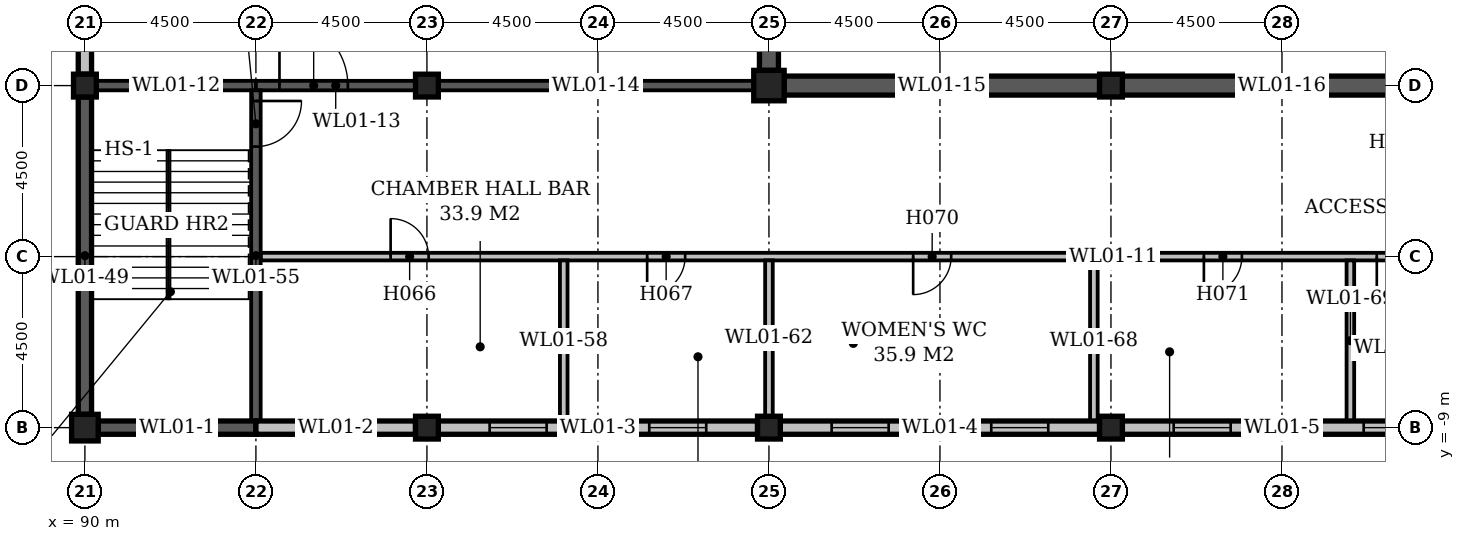
"""IFC4 building model, lengths in metres.
Left out: names, types, materials, properties, quantities, classifications, styles, units other than length and angle.
Written with IfcOpenShell. Run it as: python <this file> out.ifc"""

import sys

from ifc_helpers import new_model, si_unit, direction, frame, frame_2d, origin, origin_2d, place, context, subcontext, project, spatial, rectangle, extrude, element, fill, save


model = new_model("IFC4")
c1 = context("Model", 3, precision=1e-05, world=origin(), true_north=direction((0.0, 1.0)))
c2 = subcontext(c1, "Body", "Model", "MODEL_VIEW")
j1 = project(units=[si_unit("LENGTHUNIT", "METRE"), si_unit("PLANEANGLEUNIT", "RADIAN")], contexts=[c1])
p1 = place(None, origin())
s1 = spatial("IfcSite", under=j1, at=p1, CompositionType="ELEMENT")
p2 = place(p1, origin())
s2 = spatial("IfcBuilding", under=s1, at=p2, CompositionType="ELEMENT")
p3 = place(p2, frame((0.0, 0.0, 9.0)))
s3 = spatial("IfcBuildingStorey", under=s2, at=p3, CompositionType="ELEMENT", Elevation=9.0)
p4 = place(p3, frame((90.0, -9.0, 0.0), z_axis=(0.0, 0.0, 1.0), x_axis=(1.0, 0.0, 0.0)))
e1 = element("IfcColumn", 1, at=p4, inside=s3, PredefinedType="COLUMN", context=c2, shape_type="SweptSolid", body=[
    extrude(rectangle(XDim=0.7, YDim=0.7, at=origin_2d()), origin(), (0.0, 0.0, 1.0), 4.7),
])
for number, where, z_axis, x_axis in (
    (2, (90.0, 0.0, 0.0), (0.0, 0.0, 1.0), (1.0, 0.0, 0.0)),
    (3, (99.0, -9.0, 0.0), (0.0, 0.0, 1.0), (1.0, 0.0, 0.0)),
    (4, (99.0, 0.0, 0.0), (0.0, 0.0, 1.0), (1.0, 0.0, 0.0)),
    (5, (108.0, -9.0, 0.0), (0.0, 0.0, 1.0), (1.0, 0.0, 0.0)),
):
    element("IfcColumn", number, at=place(p3, frame(where, z_axis=z_axis, x_axis=x_axis)), inside=s3, PredefinedType="COLUMN", context=c2, shape_type="SweptSolid", body=[
        extrude(rectangle(XDim=0.6, YDim=0.6, at=origin_2d()), origin(), (0.0, 0.0, 1.0), 4.7),
    ])
p5 = place(p3, frame((108.0, 0.0, -0.3), z_axis=(0.0, 0.0, 1.0), x_axis=(1.0, 0.0, 0.0)))
e6 = element("IfcColumn", 6, at=p5, inside=s3, PredefinedType="COLUMN", context=c2, shape_type="SweptSolid", body=[
    extrude(rectangle(XDim=0.8, YDim=0.8, at=origin_2d()), origin(), (0.0, 0.0, 1.0), 5.0),
])
p6 = place(p3, frame((117.0, -9.0, 0.0), z_axis=(0.0, 0.0, 1.0), x_axis=(1.0, 0.0, 0.0)))
e7 = element("IfcColumn", 7, at=p6, inside=s3, PredefinedType="COLUMN", context=c2, shape_type="SweptSolid", body=[
    extrude(rectangle(XDim=0.6, YDim=0.6, at=origin_2d()), origin(), (0.0, 0.0, 1.0), 4.7),
])
p7 = place(p3, frame((117.0, 0.0, -0.3), z_axis=(0.0, 0.0, 1.0), x_axis=(1.0, 0.0, 0.0)))
e8 = element("IfcColumn", 8, at=p7, inside=s3, PredefinedType="COLUMN", context=c2, shape_type="SweptSolid", body=[
    extrude(rectangle(XDim=0.6, YDim=0.6, at=origin_2d()), origin(), (0.0, 0.0, 1.0), 5.0),
])
p8 = place(p3, frame((90.35, -9.0, 0.0), z_axis=(0.0, 0.0, 1.0), x_axis=(1.0, 0.0, 0.0)))
e9 = element("IfcWall", 9, at=p8, inside=s3, PredefinedType="STANDARD", context=c2, shape_type="SweptSolid", body=[
    extrude(rectangle(XDim=4.15, YDim=0.35, at=frame_2d((2.075, 0.0))), origin(), (0.0, 0.0, 1.0), 5.0),
])
p9 = place(p3, frame((94.5, -9.0, 0.0), z_axis=(0.0, 0.0, 1.0), x_axis=(1.0, 0.0, 0.0)))
e10 = element("IfcWall", 10, at=p9, inside=s3, PredefinedType="STANDARD", context=c2, shape_type="SweptSolid", body=[
    extrude(rectangle(XDim=4.2, YDim=0.35, at=frame_2d((2.1, 0.0))), origin(), (0.0, 0.0, 1.0), 4.1),
])
p10 = place(p9, frame((1.35, 0.0, 1.0)))
e11 = element("IfcOpeningElement", 11, at=p10, cuts=e10, PredefinedType="OPENING", context=c2, shape_type="SweptSolid", body=[
    extrude(rectangle(XDim=1.5, YDim=2.4, at=frame_2d((0.75, 1.2))), frame((0.0, 0.187, 0.0), z_axis=(0.0, -1.0, 0.0), x_axis=(1.0, 0.0, 0.0)), (0.0, 0.0, 1.0), 0.374),
])
p11 = place(p3, frame((99.3, -9.0, 0.0), z_axis=(0.0, 0.0, 1.0), x_axis=(1.0, 0.0, 0.0)))
e12 = element("IfcWall", 12, at=p11, inside=s3, PredefinedType="STANDARD", context=c2, shape_type="SweptSolid", body=[
    extrude(rectangle(XDim=8.4, YDim=0.35, at=frame_2d((4.2, 0.0))), origin(), (0.0, 0.0, 1.0), 4.1),
])
p12 = place(p11, frame((1.35, 0.0, 1.0)))
e13 = element("IfcOpeningElement", 13, at=p12, cuts=e12, PredefinedType="OPENING", context=c2, shape_type="SweptSolid", body=[
    extrude(rectangle(XDim=1.5, YDim=2.4, at=frame_2d((0.75, 1.2))), frame((0.0, 0.187, 0.0), z_axis=(0.0, -1.0, 0.0), x_axis=(1.0, 0.0, 0.0)), (0.0, 0.0, 1.0), 0.374),
])
p13 = place(p11, frame((5.55, 0.0, 1.0)))
e14 = element("IfcOpeningElement", 14, at=p13, cuts=e12, PredefinedType="OPENING", context=c2, shape_type="SweptSolid", body=[
    extrude(rectangle(XDim=1.5, YDim=2.4, at=frame_2d((0.75, 1.2))), frame((0.0, 0.187, 0.0), z_axis=(0.0, -1.0, 0.0), x_axis=(1.0, 0.0, 0.0)), (0.0, 0.0, 1.0), 0.374),
])
p14 = place(p3, frame((108.3, -9.0, 0.0), z_axis=(0.0, 0.0, 1.0), x_axis=(1.0, 0.0, 0.0)))
e15 = element("IfcWall", 15, at=p14, inside=s3, PredefinedType="STANDARD", context=c2, shape_type="SweptSolid", body=[
    extrude(rectangle(XDim=8.4, YDim=0.35, at=frame_2d((4.2, 0.0))), origin(), (0.0, 0.0, 1.0), 4.1),
])
p15 = place(p14, frame((1.35, 0.0, 1.0)))
e16 = element("IfcOpeningElement", 16, at=p15, cuts=e15, PredefinedType="OPENING", context=c2, shape_type="SweptSolid", body=[
    extrude(rectangle(XDim=1.5, YDim=2.4, at=frame_2d((0.75, 1.2))), frame((0.0, 0.187, 0.0), z_axis=(0.0, -1.0, 0.0), x_axis=(1.0, 0.0, 0.0)), (0.0, 0.0, 1.0), 0.374),
])
p16 = place(p14, frame((5.55, 0.0, 1.0)))
e17 = element("IfcOpeningElement", 17, at=p16, cuts=e15, PredefinedType="OPENING", context=c2, shape_type="SweptSolid", body=[
    extrude(rectangle(XDim=1.5, YDim=2.4, at=frame_2d((0.75, 1.2))), frame((0.0, 0.187, 0.0), z_axis=(0.0, -1.0, 0.0), x_axis=(1.0, 0.0, 0.0)), (0.0, 0.0, 1.0), 0.374),
])
p17 = place(p3, frame((117.3, -9.0, 0.0), z_axis=(0.0, 0.0, 1.0), x_axis=(1.0, 0.0, 0.0)))
e18 = element("IfcWall", 18, at=p17, inside=s3, PredefinedType="STANDARD", context=c2, shape_type="SweptSolid", body=[
    extrude(rectangle(XDim=8.4, YDim=0.35, at=frame_2d((4.2, 0.0))), origin(), (0.0, 0.0, 1.0), 4.1),
])
p18 = place(p17, frame((1.35, 0.0, 1.0)))
e19 = element("IfcOpeningElement", 19, at=p18, cuts=e18, PredefinedType="OPENING", context=c2, shape_type="SweptSolid", body=[
    extrude(rectangle(XDim=1.5, YDim=2.4, at=frame_2d((0.75, 1.2))), frame((0.0, 0.187, 0.0), z_axis=(0.0, -1.0, 0.0), x_axis=(1.0, 0.0, 0.0)), (0.0, 0.0, 1.0), 0.374),
])
p19 = place(p17, frame((6.35, 0.0, 1.0)))
e20 = element("IfcOpeningElement", 20, at=p19, cuts=e18, PredefinedType="OPENING", context=c2, shape_type="SweptSolid", body=[
    extrude(rectangle(XDim=1.5, YDim=2.4, at=frame_2d((0.75, 1.2))), frame((0.0, 0.187, 0.0), z_axis=(0.0, -1.0, 0.0), x_axis=(1.0, 0.0, 0.0)), (0.0, 0.0, 1.0), 0.374),
])
p20 = place(p3, frame((123.4, -6.9, 0.0), z_axis=(0.0, 0.0, 1.0), x_axis=(1.0, 0.0, 0.0)))
e21 = element("IfcWall", 21, at=p20, inside=s3, PredefinedType="STANDARD", context=c2, shape_type="SweptSolid", body=[
    extrude(rectangle(XDim=2.3, YDim=0.2, at=frame_2d((1.15, 0.0))), origin(), (0.0, 0.0, 1.0), 4.7),
])
p21 = place(p3, frame((94.625, -4.5, 0.0), z_axis=(0.0, 0.0, 1.0), x_axis=(1.0, 0.0, 0.0)))
e22 = element("IfcWall", 22, at=p21, inside=s3, PredefinedType="STANDARD", context=c2, shape_type="SweptSolid", body=[
    extrude(rectangle(XDim=44.875, YDim=0.2, at=frame_2d((22.438, 0.0))), origin(), (0.0, 0.0, 1.0), 4.7),
])
p22 = place(p21, frame((3.42, 0.0, 0.0)))
e23 = element("IfcOpeningElement", 23, at=p22, cuts=e22, PredefinedType="OPENING", context=c2, shape_type="SweptSolid", body=[
    extrude(rectangle(XDim=1.0, YDim=2.1, at=frame_2d((0.5, 1.05))), frame((0.0, 0.112, 0.0), z_axis=(0.0, -1.0, 0.0), x_axis=(1.0, 0.0, 0.0)), (0.0, 0.0, 1.0), 0.224),
])
p23 = place(p21, frame((10.17, 0.0, 0.0)))
e24 = element("IfcOpeningElement", 24, at=p23, cuts=e22, PredefinedType="OPENING", context=c2, shape_type="SweptSolid", body=[
    extrude(rectangle(XDim=1.0, YDim=2.1, at=frame_2d((0.5, 1.05))), frame((0.0, 0.112, 0.0), z_axis=(0.0, -1.0, 0.0), x_axis=(1.0, 0.0, 0.0)), (0.0, 0.0, 1.0), 0.224),
])
p24 = place(p21, frame((17.17, 0.0, 0.0)))
e25 = element("IfcOpeningElement", 25, at=p24, cuts=e22, PredefinedType="OPENING", context=c2, shape_type="SweptSolid", body=[
    extrude(rectangle(XDim=1.0, YDim=2.1, at=frame_2d((0.5, 1.05))), frame((0.0, 0.112, 0.0), z_axis=(0.0, -1.0, 0.0), x_axis=(1.0, 0.0, 0.0)), (0.0, 0.0, 1.0), 0.224),
])
p25 = place(p21, frame((24.82, 0.0, 0.0)))
e26 = element("IfcOpeningElement", 26, at=p25, cuts=e22, PredefinedType="OPENING", context=c2, shape_type="SweptSolid", body=[
    extrude(rectangle(XDim=1.0, YDim=2.1, at=frame_2d((0.5, 1.05))), frame((0.0, 0.112, 0.0), z_axis=(0.0, -1.0, 0.0), x_axis=(1.0, 0.0, 0.0)), (0.0, 0.0, 1.0), 0.224),
])
p26 = place(p21, frame((29.37, 0.0, 0.0)))
e27 = element("IfcOpeningElement", 27, at=p26, cuts=e22, PredefinedType="OPENING", context=c2, shape_type="SweptSolid", body=[
    extrude(rectangle(XDim=1.0, YDim=2.1, at=frame_2d((0.5, 1.05))), frame((0.0, 0.112, 0.0), z_axis=(0.0, -1.0, 0.0), x_axis=(1.0, 0.0, 0.0)), (0.0, 0.0, 1.0), 0.224),
])
p27 = place(p21, frame((33.87, 0.0, 0.0)))
e28 = element("IfcOpeningElement", 28, at=p27, cuts=e22, PredefinedType="OPENING", context=c2, shape_type="SweptSolid", body=[
    extrude(rectangle(XDim=1.0, YDim=2.1, at=frame_2d((0.5, 1.05))), frame((0.0, 0.112, 0.0), z_axis=(0.0, -1.0, 0.0), x_axis=(1.0, 0.0, 0.0)), (0.0, 0.0, 1.0), 0.224),
])
p28 = place(p21, frame((38.52, 0.0, 0.0)))
e29 = element("IfcOpeningElement", 29, at=p28, cuts=e22, PredefinedType="OPENING", context=c2, shape_type="SweptSolid", body=[
    extrude(rectangle(XDim=1.0, YDim=2.1, at=frame_2d((0.5, 1.05))), frame((0.0, 0.112, 0.0), z_axis=(0.0, -1.0, 0.0), x_axis=(1.0, 0.0, 0.0)), (0.0, 0.0, 1.0), 0.224),
])
p29 = place(p3, frame((90.3, 0.0, 0.0), z_axis=(0.0, 0.0, 1.0), x_axis=(1.0, 0.0, 0.0)))
e30 = element("IfcWall", 30, at=p29, inside=s3, PredefinedType="STANDARD", context=c2, shape_type="SweptSolid", body=[
    extrude(rectangle(XDim=4.2, YDim=0.25, at=frame_2d((2.1, 0.0))), origin(), (0.0, 0.0, 1.0), 5.0),
])
p30 = place(p3, frame((94.5, 0.0, 0.0), z_axis=(0.0, 0.0, 1.0), x_axis=(1.0, 0.0, 0.0)))
e31 = element("IfcWall", 31, at=p30, inside=s3, PredefinedType="STANDARD", context=c2, shape_type="SweptSolid", body=[
    extrude(rectangle(XDim=4.2, YDim=0.25, at=frame_2d((2.1, 0.0))), origin(), (0.0, 0.0, 1.0), 4.7),
])
p31 = place(p30, frame((0.62, 0.0, 0.0)))
e32 = element("IfcOpeningElement", 32, at=p31, cuts=e31, PredefinedType="OPENING", context=c2, shape_type="SweptSolid", body=[
    extrude(rectangle(XDim=1.8, YDim=2.4, at=frame_2d((0.9, 1.2))), frame((0.0, 0.137, 0.0), z_axis=(0.0, -1.0, 0.0), x_axis=(1.0, 0.0, 0.0)), (0.0, 0.0, 1.0), 0.274),
])
p32 = place(p3, frame((99.3, 0.0, 0.0), z_axis=(0.0, 0.0, 1.0), x_axis=(1.0, 0.0, 0.0)))
e33 = element("IfcWall", 33, at=p32, inside=s3, PredefinedType="STANDARD", context=c2, shape_type="SweptSolid", body=[
    extrude(rectangle(XDim=8.3, YDim=0.25, at=frame_2d((4.15, 0.0))), origin(), (0.0, 0.0, 1.0), 4.7),
])
p33 = place(p3, frame((108.4, 0.0, 0.0), z_axis=(0.0, 0.0, 1.0), x_axis=(1.0, 0.0, 0.0)))
e34 = element("IfcWall", 34, at=p33, inside=s3, PredefinedType="STANDARD", context=c2, shape_type="SweptSolid", body=[
    extrude(rectangle(XDim=8.3, YDim=0.5, at=frame_2d((4.15, 0.0))), origin(), (0.0, 0.0, 1.0), 5.0),
])
p34 = place(p3, frame((117.3, 0.0, 0.0), z_axis=(0.0, 0.0, 1.0), x_axis=(1.0, 0.0, 0.0)))
e35 = element("IfcWall", 35, at=p34, inside=s3, PredefinedType="STANDARD", context=c2, shape_type="SweptSolid", body=[
    extrude(rectangle(XDim=8.4, YDim=0.5, at=frame_2d((4.2, 0.0))), origin(), (0.0, 0.0, 1.0), 5.0),
])
p35 = place(p3, frame((90.0, -8.65, 0.0), z_axis=(0.0, 0.0, 1.0), x_axis=(0.0, 1.0, 0.0)))
e36 = element("IfcWall", 36, at=p35, inside=s3, PredefinedType="STANDARD", context=c2, shape_type="SweptSolid", body=[
    extrude(rectangle(XDim=8.35, YDim=0.35, at=frame_2d((4.175, 0.0))), origin(), (0.0, 0.0, 1.0), 5.0),
])
p36 = place(p3, frame((90.0, 0.3, 0.0), z_axis=(0.0, 0.0, 1.0), x_axis=(0.0, 1.0, 0.0)))
e37 = element("IfcWall", 37, at=p36, inside=s3, PredefinedType="STANDARD", context=c2, shape_type="SweptSolid", body=[
    extrude(rectangle(XDim=8.4, YDim=0.35, at=frame_2d((4.2, 0.0))), origin(), (0.0, 0.0, 1.0), 4.1),
])
p37 = place(p3, frame((94.5, -8.825, 0.0), z_axis=(0.0, 0.0, 1.0), x_axis=(0.0, 1.0, 0.0)))
e38 = element("IfcWall", 38, at=p37, inside=s3, PredefinedType="STANDARD", context=c2, shape_type="SweptSolid", body=[
    extrude(rectangle(XDim=8.7, YDim=0.25, at=frame_2d((4.35, 0.0))), origin(), (0.0, 0.0, 1.0), 5.0),
])
p38 = place(p37, frame((7.22, 0.0, 0.0)))
e39 = element("IfcOpeningElement", 39, at=p38, cuts=e38, PredefinedType="OPENING", context=c2, shape_type="SweptSolid", body=[
    extrude(rectangle(XDim=1.2, YDim=2.1, at=frame_2d((0.6, 1.05))), frame((0.0, 0.137, 0.0), z_axis=(0.0, -1.0, 0.0), x_axis=(1.0, 0.0, 0.0)), (0.0, 0.0, 1.0), 0.274),
])
p39 = place(p3, frame((102.6, -8.825, 0.0), z_axis=(0.0, 0.0, 1.0), x_axis=(0.0, 1.0, 0.0)))
e40 = element("IfcWall", 40, at=p39, inside=s3, PredefinedType="STANDARD", context=c2, shape_type="SweptSolid", body=[
    extrude(rectangle(XDim=4.225, YDim=0.2, at=frame_2d((2.112, 0.0))), origin(), (0.0, 0.0, 1.0), 4.7),
])
p40 = place(p3, frame((108.0, -8.7, 0.0), z_axis=(0.0, 0.0, 1.0), x_axis=(0.0, 1.0, 0.0)))
e41 = element("IfcWall", 41, at=p40, inside=s3, PredefinedType="STANDARD", context=c2, shape_type="SweptSolid", body=[
    extrude(rectangle(XDim=4.1, YDim=0.2, at=frame_2d((2.05, 0.0))), origin(), (0.0, 0.0, 1.0), 4.7),
])
p41 = place(p3, frame((108.0, 0.4, 0.0), z_axis=(0.0, 0.0, 1.0), x_axis=(0.0, 1.0, 0.0)))
e42 = element("IfcWall", 42, at=p41, inside=s3, PredefinedType="STANDARD", context=c2, shape_type="SweptSolid", body=[
    extrude(rectangle(XDim=8.2, YDim=0.5, at=frame_2d((4.1, 0.0))), origin(), (0.0, 0.0, 1.0), 5.0),
])
for number, where, z_axis, x_axis in (
    (43, (116.55, -8.825, 0.0), (0.0, 0.0, 1.0), (0.0, 1.0, 0.0)),
    (44, (123.3, -8.825, 0.0), (0.0, 0.0, 1.0), (0.0, 1.0, 0.0)),
):
    element("IfcWall", number, at=place(p3, frame(where, z_axis=z_axis, x_axis=x_axis)), inside=s3, PredefinedType="STANDARD", context=c2, shape_type="SweptSolid", body=[
        extrude(rectangle(XDim=4.225, YDim=0.2, at=frame_2d((2.112, 0.0))), origin(), (0.0, 0.0, 1.0), 4.7),
    ])
p42 = place(p31, origin())
e45 = element("IfcDoor", 45, at=p42, inside=s3, OperationType="DOUBLE_DOOR_SINGLE_SWING", PredefinedType="DOOR", context=c2, shape_type="SweptSolid", body=[
    extrude(rectangle(XDim=1.8, YDim=2.4, at=frame_2d((0.9, 1.2))), frame((0.0, 0.025, 0.0), z_axis=(0.0, -1.0, 0.0), x_axis=(1.0, 0.0, 0.0)), (0.0, 0.0, 1.0), 0.05),
])
fill(e32, e45)
p43 = place(p38, origin())
e46 = element("IfcDoor", 46, at=p43, inside=s3, OperationType="SINGLE_SWING_RIGHT", PredefinedType="DOOR", context=c2, shape_type="SweptSolid", body=[
    extrude(rectangle(XDim=1.2, YDim=2.1, at=frame_2d((0.6, 1.05))), frame((0.0, 0.025, 0.0), z_axis=(0.0, -1.0, 0.0), x_axis=(1.0, 0.0, 0.0)), (0.0, 0.0, 1.0), 0.05),
])
fill(e39, e46)
p44 = place(p22, origin())
e47 = element("IfcDoor", 47, at=p44, inside=s3, OperationType="SINGLE_SWING_LEFT", PredefinedType="DOOR", context=c2, shape_type="SweptSolid", body=[
    extrude(rectangle(XDim=1.0, YDim=2.1, at=frame_2d((0.5, 1.05))), frame((0.0, 0.025, 0.0), z_axis=(0.0, -1.0, 0.0), x_axis=(1.0, 0.0, 0.0)), (0.0, 0.0, 1.0), 0.05),
])
fill(e23, e47)
p45 = place(p23, frame((1.0, 0.0, 0.0), z_axis=(0.0, 0.0, 1.0), x_axis=(-1.0, 0.0, 0.0)))
e48 = element("IfcDoor", 48, at=p45, inside=s3, OperationType="SINGLE_SWING_RIGHT", PredefinedType="DOOR", context=c2, shape_type="SweptSolid", body=[
    extrude(rectangle(XDim=1.0, YDim=2.1, at=frame_2d((0.5, 1.05))), frame((0.0, 0.025, 0.0), z_axis=(0.0, -1.0, 0.0), x_axis=(1.0, 0.0, 0.0)), (0.0, 0.0, 1.0), 0.05),
])
fill(e24, e48)
p46 = place(p24, frame((1.0, 0.0, 0.0), z_axis=(0.0, 0.0, 1.0), x_axis=(-1.0, 0.0, 0.0)))
e49 = element("IfcDoor", 49, at=p46, inside=s3, OperationType="SINGLE_SWING_RIGHT", PredefinedType="DOOR", context=c2, shape_type="SweptSolid", body=[
    extrude(rectangle(XDim=1.0, YDim=2.1, at=frame_2d((0.5, 1.05))), frame((0.0, 0.025, 0.0), z_axis=(0.0, -1.0, 0.0), x_axis=(1.0, 0.0, 0.0)), (0.0, 0.0, 1.0), 0.05),
])
fill(e25, e49)
p47 = place(p25, frame((1.0, 0.0, 0.0), z_axis=(0.0, 0.0, 1.0), x_axis=(-1.0, 0.0, 0.0)))
e50 = element("IfcDoor", 50, at=p47, inside=s3, OperationType="SINGLE_SWING_RIGHT", PredefinedType="DOOR", context=c2, shape_type="SweptSolid", body=[
    extrude(rectangle(XDim=1.0, YDim=2.1, at=frame_2d((0.5, 1.05))), frame((0.0, 0.025, 0.0), z_axis=(0.0, -1.0, 0.0), x_axis=(1.0, 0.0, 0.0)), (0.0, 0.0, 1.0), 0.05),
])
fill(e26, e50)
p48 = place(p26, frame((1.0, 0.0, 0.0), z_axis=(0.0, 0.0, 1.0), x_axis=(-1.0, 0.0, 0.0)))
e51 = element("IfcDoor", 51, at=p48, inside=s3, OperationType="SINGLE_SWING_RIGHT", PredefinedType="DOOR", context=c2, shape_type="SweptSolid", body=[
    extrude(rectangle(XDim=1.0, YDim=2.1, at=frame_2d((0.5, 1.05))), frame((0.0, 0.025, 0.0), z_axis=(0.0, -1.0, 0.0), x_axis=(1.0, 0.0, 0.0)), (0.0, 0.0, 1.0), 0.05),
])
fill(e27, e51)
p49 = place(p10, origin())
e52 = element("IfcWindow", 52, at=p49, inside=s3, PartitioningType="SINGLE_PANEL", PredefinedType="WINDOW", context=c2, shape_type="SweptSolid", body=[
    extrude(rectangle(XDim=1.5, YDim=2.4, at=frame_2d((0.75, 1.2))), frame((0.0, 0.03, 0.0), z_axis=(0.0, -1.0, 0.0), x_axis=(1.0, 0.0, 0.0)), (0.0, 0.0, 1.0), 0.06),
])
fill(e11, e52)
p50 = place(p12, origin())
e53 = element("IfcWindow", 53, at=p50, inside=s3, PartitioningType="SINGLE_PANEL", PredefinedType="WINDOW", context=c2, shape_type="SweptSolid", body=[
    extrude(rectangle(XDim=1.5, YDim=2.4, at=frame_2d((0.75, 1.2))), frame((0.0, 0.03, 0.0), z_axis=(0.0, -1.0, 0.0), x_axis=(1.0, 0.0, 0.0)), (0.0, 0.0, 1.0), 0.06),
])
fill(e13, e53)
p51 = place(p13, origin())
e54 = element("IfcWindow", 54, at=p51, inside=s3, PartitioningType="SINGLE_PANEL", PredefinedType="WINDOW", context=c2, shape_type="SweptSolid", body=[
    extrude(rectangle(XDim=1.5, YDim=2.4, at=frame_2d((0.75, 1.2))), frame((0.0, 0.03, 0.0), z_axis=(0.0, -1.0, 0.0), x_axis=(1.0, 0.0, 0.0)), (0.0, 0.0, 1.0), 0.06),
])
fill(e14, e54)
p52 = place(p15, origin())
e55 = element("IfcWindow", 55, at=p52, inside=s3, PartitioningType="SINGLE_PANEL", PredefinedType="WINDOW", context=c2, shape_type="SweptSolid", body=[
    extrude(rectangle(XDim=1.5, YDim=2.4, at=frame_2d((0.75, 1.2))), frame((0.0, 0.03, 0.0), z_axis=(0.0, -1.0, 0.0), x_axis=(1.0, 0.0, 0.0)), (0.0, 0.0, 1.0), 0.06),
])
fill(e16, e55)
p53 = place(p16, origin())
e56 = element("IfcWindow", 56, at=p53, inside=s3, PartitioningType="SINGLE_PANEL", PredefinedType="WINDOW", context=c2, shape_type="SweptSolid", body=[
    extrude(rectangle(XDim=1.5, YDim=2.4, at=frame_2d((0.75, 1.2))), frame((0.0, 0.03, 0.0), z_axis=(0.0, -1.0, 0.0), x_axis=(1.0, 0.0, 0.0)), (0.0, 0.0, 1.0), 0.06),
])
fill(e17, e56)
p54 = place(p18, origin())
e57 = element("IfcWindow", 57, at=p54, inside=s3, PartitioningType="SINGLE_PANEL", PredefinedType="WINDOW", context=c2, shape_type="SweptSolid", body=[
    extrude(rectangle(XDim=1.5, YDim=2.4, at=frame_2d((0.75, 1.2))), frame((0.0, 0.03, 0.0), z_axis=(0.0, -1.0, 0.0), x_axis=(1.0, 0.0, 0.0)), (0.0, 0.0, 1.0), 0.06),
])
fill(e19, e57)
p55 = place(p19, origin())
e58 = element("IfcWindow", 58, at=p55, inside=s3, PartitioningType="SINGLE_PANEL", PredefinedType="WINDOW", context=c2, shape_type="SweptSolid", body=[
    extrude(rectangle(XDim=1.5, YDim=2.4, at=frame_2d((0.75, 1.2))), frame((0.0, 0.03, 0.0), z_axis=(0.0, -1.0, 0.0), x_axis=(1.0, 0.0, 0.0)), (0.0, 0.0, 1.0), 0.06),
])
fill(e20, e58)
save(model, sys.argv[1])
